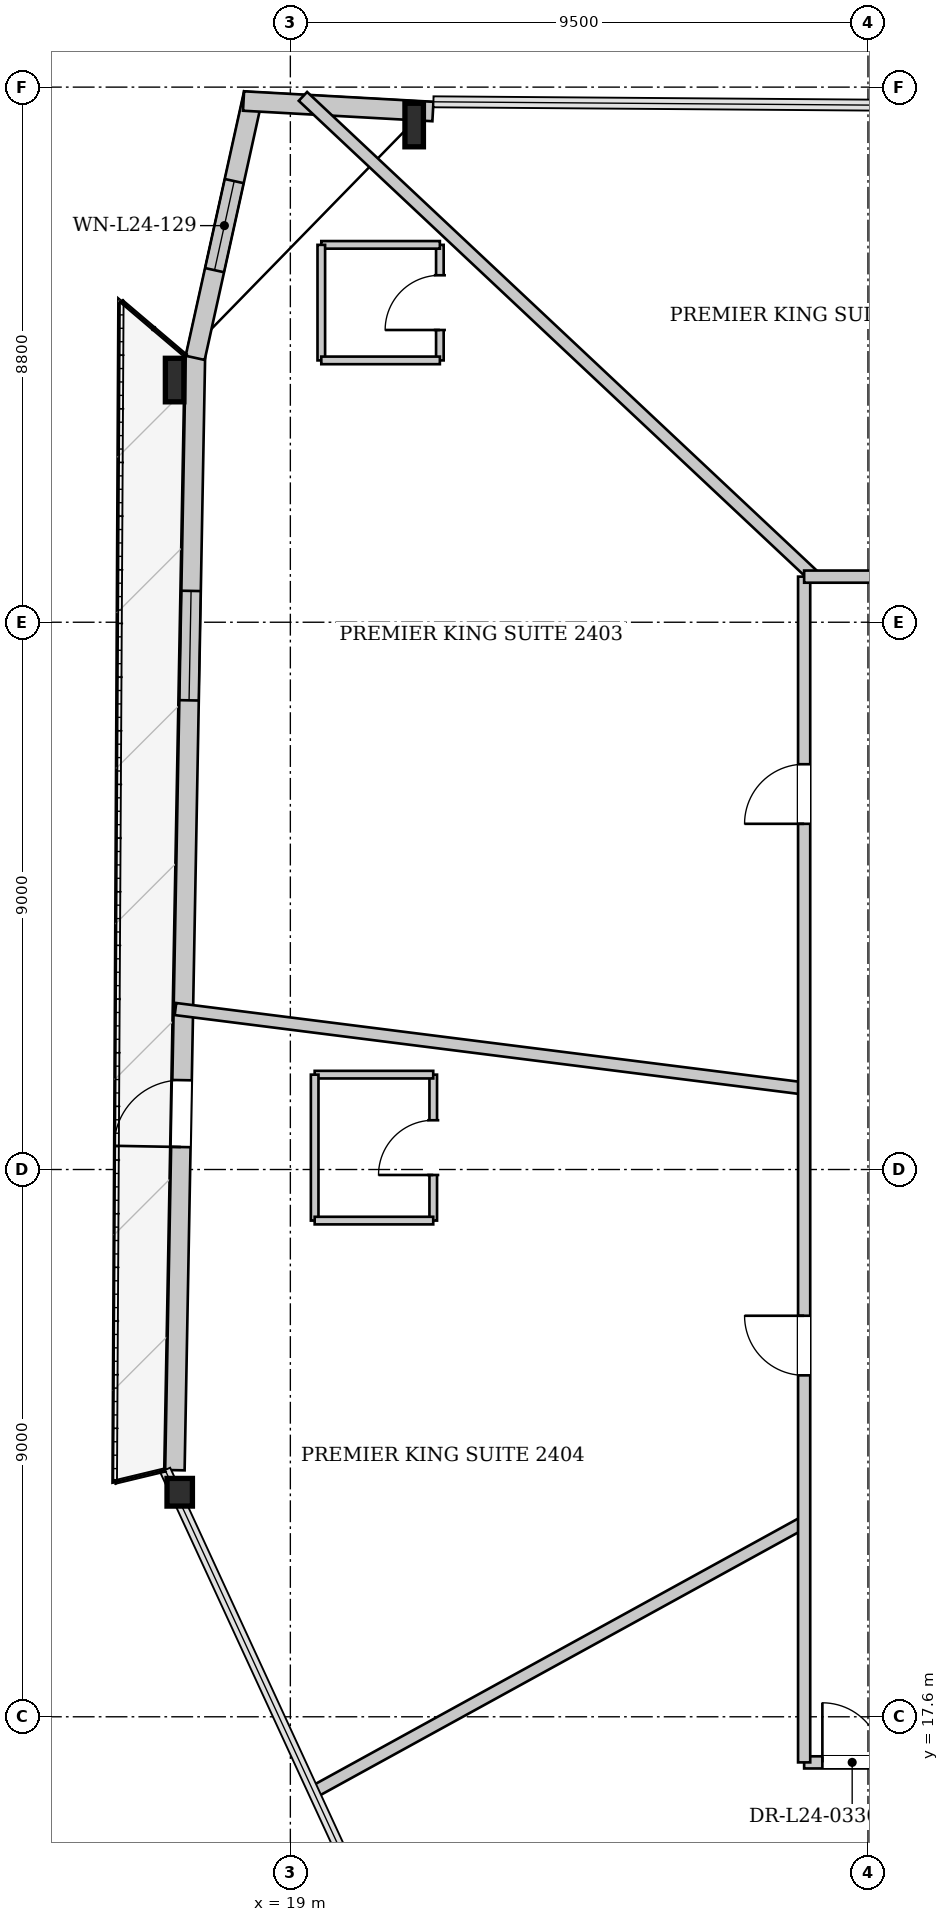
"""IFC4 building model, lengths in metres.
Left out: names, types, materials, properties, quantities, classifications, styles, units other than length and angle.
Written with IfcOpenShell. Run it as: python <this file> out.ifc"""

import sys

from ifc_helpers import new_model, si_unit, direction, frame, frame_2d, origin, origin_2d, place, context, subcontext, project, spatial, rectangle, i_section, extrude, source, transform, mapped, element, fill, save


model = new_model("IFC4")
c1 = context("Model", 3, precision=1e-05, world=origin(), true_north=direction((0.0, 1.0)))
c2 = subcontext(c1, "Body", "Model", "MODEL_VIEW")
j1 = project(units=[si_unit("LENGTHUNIT", "METRE"), si_unit("PLANEANGLEUNIT", "RADIAN")], contexts=[c1])
p1 = place(None, origin())
s1 = spatial("IfcSite", under=j1, at=p1, CompositionType="ELEMENT")
p2 = place(p1, origin())
s2 = spatial("IfcBuilding", under=s1, at=p2, CompositionType="ELEMENT")
p3 = place(p2, frame((0.0, 0.0, 95.05)))
s3 = spatial("IfcBuildingStorey", under=s2, at=p3, CompositionType="ELEMENT", Elevation=95.05)
m1 = source(origin(), c2, "Body", "SweptSolid", [
    extrude(i_section(OverallWidth=0.304, OverallDepth=0.716, WebThickness=0.021, FlangeThickness=0.04, at=origin_2d()), origin(), (0.0, 0.0, 1.0), 3.528),
])
p4 = place(p3, frame((21.354, 44.159, 0.0), z_axis=(-0.179800039019, -0.21661821483, 0.959556405311), x_axis=(0.769469151237, -0.638683979206, 0.0)))
e1 = element("IfcColumn", 1, at=p4, inside=s3, PredefinedType="COLUMN", context=c2, shape_type="MappedRepresentation", body=[
    mapped(m1, transform((0.0, 0.0, 0.0), x_axis=(1.0, 0.0, 0.0), y_axis=(0.0, 1.0, 0.0), z_axis=(0.0, 0.0, 1.0), scale=1.0)),
])
m2 = source(origin(), c2, "Body", "SweptSolid", [
    extrude(i_section(OverallWidth=0.304, OverallDepth=0.716, WebThickness=0.021, FlangeThickness=0.04, at=origin_2d()), origin(), (0.0, 0.0, 1.0), 3.497),
])
p5 = place(p3, frame((17.279, 39.982, 0.0), z_axis=(-0.104159227232, -0.228563880668, 0.967940808023), x_axis=(0.909966279987, -0.41468225099, 0.0)))
e2 = element("IfcColumn", 2, at=p5, inside=s3, PredefinedType="COLUMN", context=c2, shape_type="MappedRepresentation", body=[
    mapped(m2, transform((0.0, 0.0, 0.0), x_axis=(1.0, 0.0, 0.0), y_axis=(0.0, 1.0, 0.0), z_axis=(0.0, 0.0, 1.0), scale=1.0)),
])
m3 = source(origin(), c2, "Body", "SweptSolid", [
    extrude(i_section(OverallWidth=0.418, OverallDepth=0.455, WebThickness=0.038, FlangeThickness=0.059, at=origin_2d()), origin(), (0.0, 0.0, 1.0), 3.496),
])
p6 = place(p3, frame((16.941, 21.659, 0.0), z_axis=(0.136934213874, -0.209486303734, 0.968175867092), x_axis=(0.837038420878, 0.547144114447, 0.0)))
e3 = element("IfcColumn", 3, at=p6, inside=s3, PredefinedType="COLUMN", context=c2, shape_type="MappedRepresentation", body=[
    mapped(m3, transform((0.0, 0.0, 0.0), x_axis=(1.0, 0.0, 0.0), y_axis=(0.0, 1.0, 0.0), z_axis=(0.0, 0.0, 1.0), scale=1.0)),
])
p7 = place(p3, frame((17.101, 21.656, 0.0), z_axis=(0.0, 0.0, 1.0), x_axis=(0.018423605201, 0.999830270982, 0.0)))
e4 = element("IfcWall", 4, at=p7, inside=s3, PredefinedType="SOLIDWALL", context=c2, shape_type="SweptSolid", body=[
    extrude(rectangle(XDim=18.327, YDim=0.32, at=frame_2d((9.164, 0.0))), origin(), (0.0, 0.0, 1.0), 2.692),
])
p8 = place(p7, frame((5.315, 0.0, 0.0)))
e5 = element("IfcOpeningElement", 5, at=p8, cuts=e4, PredefinedType="OPENING", context=c2, shape_type="SweptSolid", body=[
    extrude(rectangle(XDim=1.1, YDim=2.3, at=frame_2d((0.55, 1.15))), frame((0.0, 0.17, 0.0), z_axis=(0.0, -1.0, 0.0), x_axis=(1.0, 0.0, 0.0)), (0.0, 0.0, 1.0), 0.34),
])
p9 = place(p7, frame((12.662, 0.0, 0.372)))
e6 = element("IfcOpeningElement", 6, at=p9, cuts=e4, PredefinedType="OPENING", context=c2, shape_type="SweptSolid", body=[
    extrude(rectangle(XDim=1.8, YDim=2.2, at=frame_2d((0.9, 1.1))), frame((0.0, 0.17, 0.0), z_axis=(0.0, -1.0, 0.0), x_axis=(1.0, 0.0, 0.0)), (0.0, 0.0, 1.0), 0.34),
])
p10 = place(p3, frame((17.435, 39.948, 0.0), z_axis=(0.0, 0.0, 1.0), x_axis=(0.215641796387, 0.97647253707, 0.0)))
e7 = element("IfcWall", 7, at=p10, inside=s3, PredefinedType="SOLIDWALL", context=c2, shape_type="SweptSolid", body=[
    extrude(rectangle(XDim=4.454, YDim=0.32, at=frame_2d((2.227, 0.0))), origin(), (0.0, 0.0, 1.0), 2.692),
])
p11 = place(p10, frame((1.477, 0.0, 0.272)))
e8 = element("IfcOpeningElement", 8, at=p11, cuts=e7, PredefinedType="OPENING", context=c2, shape_type="SweptSolid", body=[
    extrude(rectangle(XDim=1.5, YDim=2.3, at=frame_2d((0.75, 1.15))), frame((0.0, 0.17, 0.0), z_axis=(0.0, -1.0, 0.0), x_axis=(1.0, 0.0, 0.0)), (0.0, 0.0, 1.0), 0.34),
])
p12 = place(p3, frame((18.23, 44.172, 0.0), z_axis=(0.0, 0.0, 1.0), x_axis=(0.998463722638, -0.055409336544, 0.0)))
e9 = element("IfcWall", 9, at=p12, inside=s3, PredefinedType="SOLIDWALL", context=c2, shape_type="SweptSolid", body=[
    extrude(rectangle(XDim=3.12, YDim=0.32, at=frame_2d((1.56, 0.0))), origin(), (0.0, 0.0, 1.0), 2.692),
])
p13 = place(p3, frame((27.617, 36.35, 0.0), z_axis=(0.0, 0.0, 1.0), x_axis=(-0.728967425023, 0.684548386351, 0.0)))
e10 = element("IfcWall", 10, at=p13, inside=s3, PredefinedType="PARTITIONING", context=c2, shape_type="SweptSolid", body=[
    extrude(rectangle(XDim=11.537, YDim=0.2, at=frame_2d((5.769, 0.0))), origin(), (0.0, 0.0, 1.0), 2.795),
])
p14 = place(p3, frame((27.45, 27.933, 0.0), z_axis=(0.0, 0.0, 1.0), x_axis=(-0.992114844566, 0.125332099609, 0.0)))
e11 = element("IfcWall", 11, at=p14, inside=s3, PredefinedType="PARTITIONING", context=c2, shape_type="SweptSolid", body=[
    extrude(rectangle(XDim=10.422, YDim=0.2, at=frame_2d((5.211, 0.0))), origin(), (0.0, 0.0, 1.0), 3.3),
])
p15 = place(p3, frame((27.45, 20.8, 0.0), z_axis=(0.0, 0.0, 1.0), x_axis=(-0.876309701185, -0.481748178625, 0.0)))
e12 = element("IfcWall", 12, at=p15, inside=s3, PredefinedType="PARTITIONING", context=c2, shape_type="SweptSolid", body=[
    extrude(rectangle(XDim=9.176, YDim=0.2, at=frame_2d((4.588, 0.0))), origin(), (0.0, 0.0, 1.0), 3.3),
])
p16 = place(p3, frame((33.412, 16.85, 0.0), z_axis=(0.0, 0.0, 1.0), x_axis=(-0.425776318431, -0.904828451511, 0.0)))
e13 = element("IfcWall", 13, at=p16, inside=s3, PredefinedType="PARTITIONING", context=c2, shape_type="SweptSolid", body=[
    extrude(rectangle(XDim=14.188, YDim=0.2, at=frame_2d((7.094, 0.0))), origin(), (0.0, 0.0, 1.0), 3.3),
])
p17 = place(p3, frame((21.459, 39.906, 0.0), z_axis=(0.0, 0.0, 1.0), x_axis=(0.0, 1.0, 0.0)))
e14 = element("IfcWall", 14, at=p17, inside=s3, PredefinedType="PARTITIONING", context=c2, shape_type="SweptSolid", body=[
    extrude(rectangle(XDim=1.9, YDim=0.125, at=frame_2d((0.95, 0.0))), origin(), (0.0, 0.0, 1.0), 3.3),
])
p18 = place(p17, frame((0.5, 0.0, 0.0)))
e15 = element("IfcOpeningElement", 15, at=p18, cuts=e14, PredefinedType="OPENING", context=c2, shape_type="SweptSolid", body=[
    extrude(rectangle(XDim=0.9, YDim=2.1, at=frame_2d((0.45, 1.05))), frame((0.0, 0.073, 0.0), z_axis=(0.0, -1.0, 0.0), x_axis=(1.0, 0.0, 0.0)), (0.0, 0.0, 1.0), 0.145),
])
p19 = place(p3, frame((21.459, 41.806, 0.0), z_axis=(0.0, 0.0, 1.0), x_axis=(-1.0, 0.0, 0.0)))
e16 = element("IfcWall", 16, at=p19, inside=s3, PredefinedType="PARTITIONING", context=c2, shape_type="SweptSolid", body=[
    extrude(rectangle(XDim=1.95, YDim=0.125, at=frame_2d((0.975, 0.0))), origin(), (0.0, 0.0, 1.0), 3.3),
])
p20 = place(p3, frame((19.509, 41.806, 0.0), z_axis=(0.0, 0.0, 1.0), x_axis=(0.0, -1.0, 0.0)))
e17 = element("IfcWall", 17, at=p20, inside=s3, PredefinedType="PARTITIONING", context=c2, shape_type="SweptSolid", body=[
    extrude(rectangle(XDim=1.9, YDim=0.125, at=frame_2d((0.95, 0.0))), origin(), (0.0, 0.0, 1.0), 3.3),
])
p21 = place(p3, frame((19.509, 39.906, 0.0), z_axis=(0.0, 0.0, 1.0), x_axis=(1.0, 0.0, 0.0)))
e18 = element("IfcWall", 18, at=p21, inside=s3, PredefinedType="PARTITIONING", context=c2, shape_type="SweptSolid", body=[
    extrude(rectangle(XDim=1.95, YDim=0.125, at=frame_2d((0.975, 0.0))), origin(), (0.0, 0.0, 1.0), 3.3),
])
p22 = place(p3, frame((21.35, 25.76, 0.0), z_axis=(0.0, 0.0, 1.0), x_axis=(0.0, 1.0, 0.0)))
e19 = element("IfcWall", 19, at=p22, inside=s3, PredefinedType="PARTITIONING", context=c2, shape_type="SweptSolid", body=[
    extrude(rectangle(XDim=2.4, YDim=0.125, at=frame_2d((1.2, 0.0))), origin(), (0.0, 0.0, 1.0), 3.3),
])
p23 = place(p22, frame((0.75, 0.0, 0.0)))
e20 = element("IfcOpeningElement", 20, at=p23, cuts=e19, PredefinedType="OPENING", context=c2, shape_type="SweptSolid", body=[
    extrude(rectangle(XDim=0.9, YDim=2.1, at=frame_2d((0.45, 1.05))), frame((0.0, 0.073, 0.0), z_axis=(0.0, -1.0, 0.0), x_axis=(1.0, 0.0, 0.0)), (0.0, 0.0, 1.0), 0.145),
])
p24 = place(p3, frame((21.35, 28.16, 0.0), z_axis=(0.0, 0.0, 1.0), x_axis=(-1.0, 0.0, 0.0)))
e21 = element("IfcWall", 21, at=p24, inside=s3, PredefinedType="PARTITIONING", context=c2, shape_type="SweptSolid", body=[
    extrude(rectangle(XDim=1.95, YDim=0.125, at=frame_2d((0.975, 0.0))), origin(), (0.0, 0.0, 1.0), 3.3),
])
p25 = place(p3, frame((19.4, 28.16, 0.0), z_axis=(0.0, 0.0, 1.0), x_axis=(0.0, -1.0, 0.0)))
e22 = element("IfcWall", 22, at=p25, inside=s3, PredefinedType="PARTITIONING", context=c2, shape_type="SweptSolid", body=[
    extrude(rectangle(XDim=2.4, YDim=0.125, at=frame_2d((1.2, 0.0))), origin(), (0.0, 0.0, 1.0), 3.3),
])
p26 = place(p3, frame((19.4, 25.76, 0.0), z_axis=(0.0, 0.0, 1.0), x_axis=(1.0, 0.0, 0.0)))
e23 = element("IfcWall", 23, at=p26, inside=s3, PredefinedType="PARTITIONING", context=c2, shape_type="SweptSolid", body=[
    extrude(rectangle(XDim=1.95, YDim=0.125, at=frame_2d((0.975, 0.0))), origin(), (0.0, 0.0, 1.0), 3.3),
])
p27 = place(p3, frame((27.45, 16.85, 0.0), z_axis=(0.0, 0.0, 1.0), x_axis=(1.0, 0.0, 0.0)))
e24 = element("IfcWall", 24, at=p27, inside=s3, PredefinedType="PARTITIONING", context=c2, shape_type="SweptSolid", body=[
    extrude(rectangle(XDim=21.1, YDim=0.2, at=frame_2d((10.55, 0.0))), origin(), (0.0, 0.0, 1.0), 3.3),
])
p28 = place(p27, frame((0.3, 0.0, 0.0)))
e25 = element("IfcOpeningElement", 25, at=p28, cuts=e24, PredefinedType="OPENING", context=c2, shape_type="SweptSolid", body=[
    extrude(rectangle(XDim=0.98, YDim=2.15, at=frame_2d((0.49, 1.075))), frame((0.0, 0.11, 0.0), z_axis=(0.0, -1.0, 0.0), x_axis=(1.0, 0.0, 0.0)), (0.0, 0.0, 1.0), 0.22),
])
p29 = place(p27, frame((8.16, 0.0, 0.0)))
e26 = element("IfcOpeningElement", 26, at=p29, cuts=e24, PredefinedType="OPENING", context=c2, shape_type="SweptSolid", body=[
    extrude(rectangle(XDim=0.98, YDim=2.15, at=frame_2d((0.49, 1.075))), frame((0.0, 0.11, 0.0), z_axis=(0.0, -1.0, 0.0), x_axis=(1.0, 0.0, 0.0)), (0.0, 0.0, 1.0), 0.22),
])
p30 = place(p27, frame((18.286, 0.0, 0.0)))
e27 = element("IfcOpeningElement", 27, at=p30, cuts=e24, PredefinedType="OPENING", context=c2, shape_type="SweptSolid", body=[
    extrude(rectangle(XDim=0.98, YDim=2.15, at=frame_2d((0.49, 1.075))), frame((0.0, 0.11, 0.0), z_axis=(0.0, -1.0, 0.0), x_axis=(1.0, 0.0, 0.0)), (0.0, 0.0, 1.0), 0.22),
])
p31 = place(p3, frame((27.45, 16.85, 0.0), z_axis=(0.0, 0.0, 1.0), x_axis=(0.0, 1.0, 0.0)))
e28 = element("IfcWall", 28, at=p31, inside=s3, PredefinedType="PARTITIONING", context=c2, shape_type="SweptSolid", body=[
    extrude(rectangle(XDim=19.5, YDim=0.2, at=frame_2d((9.75, 0.0))), origin(), (0.0, 0.0, 1.0), 3.3),
])
p32 = place(p31, frame((15.435, 0.0, 0.0)))
e29 = element("IfcOpeningElement", 29, at=p32, cuts=e28, PredefinedType="OPENING", context=c2, shape_type="SweptSolid", body=[
    extrude(rectangle(XDim=0.98, YDim=2.15, at=frame_2d((0.49, 1.075))), frame((0.0, 0.11, 0.0), z_axis=(0.0, -1.0, 0.0), x_axis=(1.0, 0.0, 0.0)), (0.0, 0.0, 1.0), 0.22),
])
p33 = place(p31, frame((6.365, 0.0, 0.0)))
e30 = element("IfcOpeningElement", 30, at=p33, cuts=e28, PredefinedType="OPENING", context=c2, shape_type="SweptSolid", body=[
    extrude(rectangle(XDim=0.98, YDim=2.15, at=frame_2d((0.49, 1.075))), frame((0.0, 0.11, 0.0), z_axis=(0.0, -1.0, 0.0), x_axis=(1.0, 0.0, 0.0)), (0.0, 0.0, 1.0), 0.22),
])
p34 = place(p3, frame((27.45, 36.35, 0.0), z_axis=(0.0, 0.0, 1.0), x_axis=(1.0, 0.0, 0.0)))
e31 = element("IfcWall", 31, at=p34, inside=s3, PredefinedType="PARTITIONING", context=c2, shape_type="SweptSolid", body=[
    extrude(rectangle(XDim=21.1, YDim=0.2, at=frame_2d((10.55, 0.0))), origin(), (0.0, 0.0, 1.0), 3.3),
])
p35 = place(p34, frame((11.722, 0.0, 0.0)))
e32 = element("IfcOpeningElement", 32, at=p35, cuts=e31, PredefinedType="OPENING", context=c2, shape_type="SweptSolid", body=[
    extrude(rectangle(XDim=0.98, YDim=2.15, at=frame_2d((0.49, 1.075))), frame((0.0, 0.11, 0.0), z_axis=(0.0, -1.0, 0.0), x_axis=(1.0, 0.0, 0.0)), (0.0, 0.0, 1.0), 0.22),
])
p36 = place(p34, frame((1.25, 0.0, 0.0)))
e33 = element("IfcOpeningElement", 33, at=p36, cuts=e31, PredefinedType="OPENING", context=c2, shape_type="SweptSolid", body=[
    extrude(rectangle(XDim=0.98, YDim=2.15, at=frame_2d((0.49, 1.075))), frame((0.0, 0.11, 0.0), z_axis=(0.0, -1.0, 0.0), x_axis=(1.0, 0.0, 0.0)), (0.0, 0.0, 1.0), 0.22),
])
p37 = place(p34, frame((19.82, 0.0, 0.0)))
e34 = element("IfcOpeningElement", 34, at=p37, cuts=e31, PredefinedType="OPENING", context=c2, shape_type="SweptSolid", body=[
    extrude(rectangle(XDim=0.98, YDim=2.15, at=frame_2d((0.49, 1.075))), frame((0.0, 0.11, 0.0), z_axis=(0.0, -1.0, 0.0), x_axis=(1.0, 0.0, 0.0)), (0.0, 0.0, 1.0), 0.22),
])
m4 = source(origin(), c2, "Body", "SweptSolid", [
    extrude(rectangle(XDim=1.1, YDim=2.3, at=frame_2d((0.55, 1.15))), frame((0.0, 0.025, 0.0), z_axis=(0.0, -1.0, 0.0), x_axis=(1.0, 0.0, 0.0)), (0.0, 0.0, 1.0), 0.05),
])
p38 = place(p8, origin())
e35 = element("IfcDoor", 35, at=p38, inside=s3, OperationType="SINGLE_SWING_LEFT", PredefinedType="DOOR", context=c2, shape_type="MappedRepresentation", body=[
    mapped(m4, transform((0.0, 0.0, 0.0), x_axis=(1.0, 0.0, 0.0), y_axis=(0.0, 1.0, 0.0), z_axis=(0.0, 0.0, 1.0), scale=1.0)),
])
fill(e5, e35)
m5 = source(origin(), c2, "Body", "SweptSolid", [
    extrude(rectangle(XDim=1.8, YDim=2.2, at=frame_2d((0.9, 1.1))), frame((0.0, 0.03, 0.0), z_axis=(0.0, -1.0, 0.0), x_axis=(1.0, 0.0, 0.0)), (0.0, 0.0, 1.0), 0.06),
])
p39 = place(p9, origin())
e36 = element("IfcWindow", 36, at=p39, inside=s3, PartitioningType="SINGLE_PANEL", PredefinedType="WINDOW", context=c2, shape_type="MappedRepresentation", body=[
    mapped(m5, transform((0.0, 0.0, 0.0), x_axis=(1.0, 0.0, 0.0), y_axis=(0.0, 1.0, 0.0), z_axis=(0.0, 0.0, 1.0), scale=1.0)),
])
fill(e6, e36)
m6 = source(origin(), c2, "Body", "SweptSolid", [
    extrude(rectangle(XDim=1.5, YDim=2.3, at=frame_2d((0.75, 1.15))), frame((0.0, 0.03, 0.0), z_axis=(0.0, -1.0, 0.0), x_axis=(1.0, 0.0, 0.0)), (0.0, 0.0, 1.0), 0.06),
])
p40 = place(p11, origin())
e37 = element("IfcWindow", 37, at=p40, inside=s3, PartitioningType="SINGLE_PANEL", PredefinedType="WINDOW", context=c2, shape_type="MappedRepresentation", body=[
    mapped(m6, transform((0.0, 0.0, 0.0), x_axis=(1.0, 0.0, 0.0), y_axis=(0.0, 1.0, 0.0), z_axis=(0.0, 0.0, 1.0), scale=1.0)),
])
fill(e8, e37)
m7 = source(origin(), c2, "Body", "SweptSolid", [
    extrude(rectangle(XDim=0.9, YDim=2.1, at=frame_2d((0.45, 1.05))), frame((0.0, 0.025, 0.0), z_axis=(0.0, -1.0, 0.0), x_axis=(1.0, 0.0, 0.0)), (0.0, 0.0, 1.0), 0.05),
])
p41 = place(p18, origin())
e38 = element("IfcDoor", 38, at=p41, inside=s3, OperationType="SINGLE_SWING_LEFT", PredefinedType="DOOR", context=c2, shape_type="MappedRepresentation", body=[
    mapped(m7, transform((0.0, 0.0, 0.0), x_axis=(1.0, 0.0, 0.0), y_axis=(0.0, 1.0, 0.0), z_axis=(0.0, 0.0, 1.0), scale=1.0)),
])
fill(e15, e38)
p42 = place(p23, origin())
e39 = element("IfcDoor", 39, at=p42, inside=s3, OperationType="SINGLE_SWING_LEFT", PredefinedType="DOOR", context=c2, shape_type="MappedRepresentation", body=[
    mapped(m7, transform((0.0, 0.0, 0.0), x_axis=(1.0, 0.0, 0.0), y_axis=(0.0, 1.0, 0.0), z_axis=(0.0, 0.0, 1.0), scale=1.0)),
])
fill(e20, e39)
m8 = source(origin(), c2, "Body", "SweptSolid", [
    extrude(rectangle(XDim=0.98, YDim=2.15, at=frame_2d((0.49, 1.075))), frame((0.0, 0.025, 0.0), z_axis=(0.0, -1.0, 0.0), x_axis=(1.0, 0.0, 0.0)), (0.0, 0.0, 1.0), 0.05),
])
p43 = place(p28, origin())
e40 = element("IfcDoor", 40, at=p43, inside=s3, OperationType="SINGLE_SWING_LEFT", PredefinedType="DOOR", context=c2, shape_type="MappedRepresentation", body=[
    mapped(m8, transform((0.0, 0.0, 0.0), x_axis=(1.0, 0.0, 0.0), y_axis=(0.0, 1.0, 0.0), z_axis=(0.0, 0.0, 1.0), scale=1.0)),
])
fill(e25, e40)
p44 = place(p32, origin())
e41 = element("IfcDoor", 41, at=p44, inside=s3, OperationType="SINGLE_SWING_LEFT", PredefinedType="DOOR", context=c2, shape_type="MappedRepresentation", body=[
    mapped(m8, transform((0.0, 0.0, 0.0), x_axis=(1.0, 0.0, 0.0), y_axis=(0.0, 1.0, 0.0), z_axis=(0.0, 0.0, 1.0), scale=1.0)),
])
fill(e29, e41)
p45 = place(p33, origin())
e42 = element("IfcDoor", 42, at=p45, inside=s3, OperationType="SINGLE_SWING_RIGHT", PredefinedType="DOOR", context=c2, shape_type="MappedRepresentation", body=[
    mapped(m8, transform((0.0, 0.0, 0.0), x_axis=(1.0, 0.0, 0.0), y_axis=(0.0, 1.0, 0.0), z_axis=(0.0, 0.0, 1.0), scale=1.0)),
])
fill(e30, e42)
save(model, sys.argv[1])
